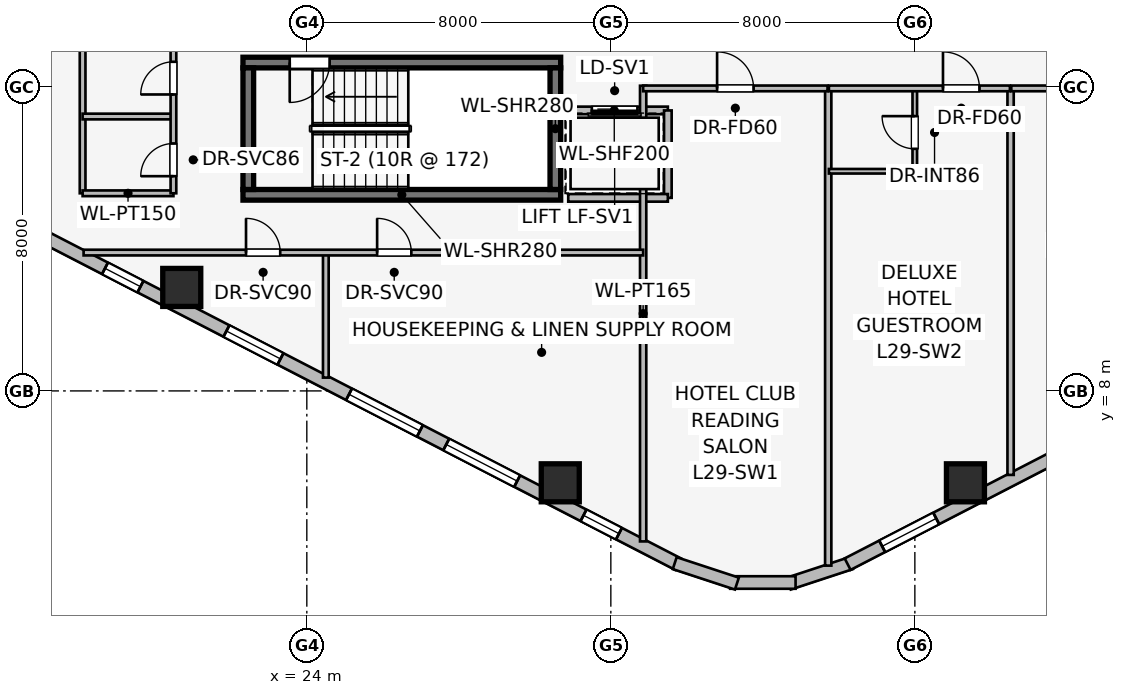
"""IFC4 building model, lengths in metres.
Left out: names, types, materials, properties, quantities, classifications, styles, units other than length and angle.
Written with IfcOpenShell. Run it as: python <this file> out.ifc"""

import sys

from ifc_helpers import new_model, si_unit, direction, frame, frame_2d, origin, origin_2d, place, context, subcontext, project, spatial, rectangle, extrude, element, fill, save


model = new_model("IFC4")
c1 = context("Model", 3, precision=1e-05, world=origin(), true_north=direction((0.0, 1.0)))
c2 = subcontext(c1, "Body", "Model", "MODEL_VIEW")
j1 = project(units=[si_unit("LENGTHUNIT", "METRE"), si_unit("PLANEANGLEUNIT", "RADIAN")], contexts=[c1])
p1 = place(None, origin())
s1 = spatial("IfcSite", under=j1, at=p1, CompositionType="ELEMENT")
p2 = place(p1, origin())
s2 = spatial("IfcBuilding", under=s1, at=p2, CompositionType="ELEMENT")
p3 = place(p2, frame((0.0, 0.0, 111.9)))
s3 = spatial("IfcBuildingStorey", under=s2, at=p3, CompositionType="ELEMENT", Elevation=111.9)
p4 = place(p3, frame((22.32, 13.16, 0.0), z_axis=(0.0, 0.0, 1.0), x_axis=(1.0, 0.0, 0.0)))
e1 = element("IfcWall", 1, at=p4, inside=s3, PredefinedType="SHEAR", context=c2, shape_type="SweptSolid", body=[
    extrude(rectangle(XDim=8.36, YDim=0.28, at=frame_2d((4.18, 0.0))), origin(), (0.0, 0.0, 1.0), 3.45),
])
p5 = place(p3, frame((30.68, 16.64, 0.0), z_axis=(0.0, 0.0, 1.0), x_axis=(-1.0, 0.0, 0.0)))
e2 = element("IfcWall", 2, at=p5, inside=s3, PredefinedType="SHEAR", context=c2, shape_type="SweptSolid", body=[
    extrude(rectangle(XDim=8.36, YDim=0.28, at=frame_2d((4.18, 0.0))), origin(), (0.0, 0.0, 1.0), 3.45),
])
p6 = place(p5, frame((6.08, 0.0, 0.0)))
e3 = element("IfcOpeningElement", 3, at=p6, cuts=e2, PredefinedType="OPENING", context=c2, shape_type="SweptSolid", body=[
    extrude(rectangle(XDim=1.05, YDim=2.0, at=frame_2d((0.525, 1.0))), frame((0.0, 0.15, 0.0), z_axis=(0.0, -1.0, 0.0), x_axis=(1.0, 0.0, 0.0)), (0.0, 0.0, 1.0), 0.3),
])
for number, where, z_axis, x_axis in (
    (4, (22.46, 16.5, 0.0), (0.0, 0.0, 1.0), (0.0, -1.0, 0.0)),
    (5, (30.54, 13.3, 0.0), (0.0, 0.0, 1.0), (0.0, 1.0, 0.0)),
):
    element("IfcWall", number, at=place(p3, frame(where, z_axis=z_axis, x_axis=x_axis)), inside=s3, PredefinedType="SHEAR", context=c2, shape_type="SweptSolid", body=[
        extrude(rectangle(XDim=3.2, YDim=0.28, at=frame_2d((1.6, 0.0))), origin(), (0.0, 0.0, 1.0), 3.45),
    ])
for number, where, z_axis, x_axis in (
    (6, (20.709, 10.723, 0.0), (0.0, 0.0, 1.0), (1.0, 0.0, 0.0)),
    (7, (30.669, 5.582, 0.0), (0.0, 0.0, 1.0), (1.0, 0.0, 0.0)),
    (8, (41.331, 5.582, 0.0), (0.0, 0.0, 1.0), (1.0, 0.0, 0.0)),
):
    element("IfcColumn", number, at=place(p3, frame(where, z_axis=z_axis, x_axis=x_axis)), inside=s3, PredefinedType="COLUMN", context=c2, shape_type="SweptSolid", body=[
        extrude(rectangle(XDim=1.0, YDim=1.0, at=origin_2d()), origin(), (0.0, 0.0, 1.0), 3.45),
    ])
p7 = place(p3, frame((17.243, 11.95, 0.0), z_axis=(0.0, 0.0, 1.0), x_axis=(-0.790621329885, 0.612305408053, 0.0)))
e9 = element("IfcWall", 9, at=p7, inside=s3, PredefinedType="STANDARD", context=c2, shape_type="SweptSolid", body=[
    extrude(rectangle(XDim=1.676, YDim=0.33, at=frame_2d((0.838, 0.0))), origin(), (0.0, 0.0, 1.0), 3.16),
])
p8 = place(p3, frame((33.769, 3.442, 0.0), z_axis=(0.0, 0.0, 1.0), x_axis=(-0.888613612362, 0.458656568606, 0.0)))
e10 = element("IfcWall", 10, at=p8, inside=s3, PredefinedType="STANDARD", context=c2, shape_type="SweptSolid", body=[
    extrude(rectangle(XDim=18.681, YDim=0.34, at=frame_2d((9.34, 0.0))), origin(), (0.0, 0.0, 1.0), 3.16),
])
p9 = place(p8, frame((1.75, 0.0, 0.75)))
e11 = element("IfcOpeningElement", 11, at=p9, cuts=e10, PredefinedType="OPENING", context=c2, shape_type="SweptSolid", body=[
    extrude(rectangle(XDim=1.05, YDim=1.4, at=frame_2d((0.525, 0.7))), frame((0.0, 0.18, 0.0), z_axis=(0.0, -1.0, 0.0), x_axis=(1.0, 0.0, 0.0)), (0.0, 0.0, 1.0), 0.36),
])
p10 = place(p8, frame((4.765, 0.0, 0.75)))
e12 = element("IfcOpeningElement", 12, at=p10, cuts=e10, PredefinedType="OPENING", context=c2, shape_type="SweptSolid", body=[
    extrude(rectangle(XDim=2.1, YDim=1.5, at=frame_2d((1.05, 0.75))), frame((0.0, 0.18, 0.0), z_axis=(0.0, -1.0, 0.0), x_axis=(1.0, 0.0, 0.0)), (0.0, 0.0, 1.0), 0.36),
])
p11 = place(p8, frame((7.644, 0.0, 0.75)))
e13 = element("IfcOpeningElement", 13, at=p11, cuts=e10, PredefinedType="OPENING", context=c2, shape_type="SweptSolid", body=[
    extrude(rectangle(XDim=2.1, YDim=1.5, at=frame_2d((1.05, 0.75))), frame((0.0, 0.18, 0.0), z_axis=(0.0, -1.0, 0.0), x_axis=(1.0, 0.0, 0.0)), (0.0, 0.0, 1.0), 0.36),
])
p12 = place(p8, frame((11.774, 0.0, 0.75)))
e14 = element("IfcOpeningElement", 14, at=p12, cuts=e10, PredefinedType="OPENING", context=c2, shape_type="SweptSolid", body=[
    extrude(rectangle(XDim=1.6, YDim=1.55, at=frame_2d((0.8, 0.775))), frame((0.0, 0.18, 0.0), z_axis=(0.0, -1.0, 0.0), x_axis=(1.0, 0.0, 0.0)), (0.0, 0.0, 1.0), 0.36),
])
p13 = place(p8, frame((15.92, 0.0, 0.75)))
e15 = element("IfcOpeningElement", 15, at=p13, cuts=e10, PredefinedType="OPENING", context=c2, shape_type="SweptSolid", body=[
    extrude(rectangle(XDim=1.05, YDim=1.4, at=frame_2d((0.525, 0.7))), frame((0.0, 0.18, 0.0), z_axis=(0.0, -1.0, 0.0), x_axis=(1.0, 0.0, 0.0)), (0.0, 0.0, 1.0), 0.36),
])
for number, where, z_axis, x_axis in (
    (16, (38.319, 3.468, 0.0), (0.0, 0.0, 1.0), (-0.95, -0.312, 0.0)),
    (17, (36.861, 2.959, 0.0), (0.0, 0.0, 1.0), (-1.0, 0.0, 0.0)),
    (18, (35.317, 2.93, 0.0), (0.0, 0.0, 1.0), (-0.95, 0.312, 0.0)),
):
    element("IfcWall", number, at=place(p3, frame(where, z_axis=z_axis, x_axis=x_axis)), inside=s3, PredefinedType="STANDARD", context=c2, shape_type="SweptSolid", body=[
        extrude(rectangle(XDim=1.722, YDim=0.33, at=frame_2d((0.861, 0.0))), origin(), (0.0, 0.0, 1.0), 3.16),
    ])
p14 = place(p3, frame((54.831, 12.01, 0.0), z_axis=(0.0, 0.0, 1.0), x_axis=(-0.888613612362, -0.458656568606, 0.0)))
e19 = element("IfcWall", 19, at=p14, inside=s3, PredefinedType="STANDARD", context=c2, shape_type="SweptSolid", body=[
    extrude(rectangle(XDim=18.681, YDim=0.34, at=frame_2d((9.34, 0.0))), origin(), (0.0, 0.0, 1.0), 3.16),
])
p15 = place(p14, frame((1.023, 0.0, 0.75)))
e20 = element("IfcOpeningElement", 20, at=p15, cuts=e19, PredefinedType="OPENING", context=c2, shape_type="SweptSolid", body=[
    extrude(rectangle(XDim=1.6, YDim=1.55, at=frame_2d((0.8, 0.775))), frame((0.0, 0.18, 0.0), z_axis=(0.0, -1.0, 0.0), x_axis=(1.0, 0.0, 0.0)), (0.0, 0.0, 1.0), 0.36),
])
p16 = place(p14, frame((6.848, 0.0, 0.75)))
e21 = element("IfcOpeningElement", 21, at=p16, cuts=e19, PredefinedType="OPENING", context=c2, shape_type="SweptSolid", body=[
    extrude(rectangle(XDim=2.1, YDim=1.5, at=frame_2d((1.05, 0.75))), frame((0.0, 0.18, 0.0), z_axis=(0.0, -1.0, 0.0), x_axis=(1.0, 0.0, 0.0)), (0.0, 0.0, 1.0), 0.36),
])
p17 = place(p14, frame((10.536, 0.0, 0.75)))
e22 = element("IfcOpeningElement", 22, at=p17, cuts=e19, PredefinedType="OPENING", context=c2, shape_type="SweptSolid", body=[
    extrude(rectangle(XDim=2.1, YDim=1.5, at=frame_2d((1.05, 0.75))), frame((0.0, 0.18, 0.0), z_axis=(0.0, -1.0, 0.0), x_axis=(1.0, 0.0, 0.0)), (0.0, 0.0, 1.0), 0.36),
])
p18 = place(p14, frame((16.058, 0.0, 0.75)))
e23 = element("IfcOpeningElement", 23, at=p18, cuts=e19, PredefinedType="OPENING", context=c2, shape_type="SweptSolid", body=[
    extrude(rectangle(XDim=1.6, YDim=1.55, at=frame_2d((0.8, 0.775))), frame((0.0, 0.18, 0.0), z_axis=(0.0, -1.0, 0.0), x_axis=(1.0, 0.0, 0.0)), (0.0, 0.0, 1.0), 0.36),
])
p19 = place(p3, frame((33.5, 15.38, 0.0), z_axis=(0.0, 0.0, 1.0), x_axis=(-1.0, 0.0, 0.0)))
e24 = element("IfcWall", 24, at=p19, inside=s3, PredefinedType="PARTITIONING", context=c2, shape_type="SweptSolid", body=[
    extrude(rectangle(XDim=2.82, YDim=0.2, at=frame_2d((1.41, 0.0))), origin(), (0.0, 0.0, 1.0), 3.16),
])
p20 = place(p19, frame((0.8, 0.0, 0.0)))
e25 = element("IfcOpeningElement", 25, at=p20, cuts=e24, PredefinedType="OPENING", context=c2, shape_type="SweptSolid", body=[
    extrude(rectangle(XDim=1.2, YDim=2.2, at=frame_2d((0.6, 1.1))), frame((0.0, 0.11, 0.0), z_axis=(0.0, -1.0, 0.0), x_axis=(1.0, 0.0, 0.0)), (0.0, 0.0, 1.0), 0.22),
])
p21 = place(p3, frame((33.5, 13.08, 0.0), z_axis=(0.0, 0.0, 1.0), x_axis=(0.0, 1.0, 0.0)))
e26 = element("IfcWall", 26, at=p21, inside=s3, PredefinedType="PARTITIONING", context=c2, shape_type="SweptSolid", body=[
    extrude(rectangle(XDim=2.3, YDim=0.2, at=frame_2d((1.15, 0.0))), origin(), (0.0, 0.0, 1.0), 3.16),
])
p22 = place(p3, frame((30.879, 13.08, 0.0), z_axis=(0.0, 0.0, 1.0), x_axis=(1.0, 0.0, 0.0)))
e27 = element("IfcWall", 27, at=p22, inside=s3, PredefinedType="PARTITIONING", context=c2, shape_type="SweptSolid", body=[
    extrude(rectangle(XDim=2.621, YDim=0.2, at=frame_2d((1.311, 0.0))), origin(), (0.0, 0.0, 1.0), 3.16),
])
p23 = place(p3, frame((18.1, 17.34, 0.0), z_axis=(0.0, 0.0, 1.0), x_axis=(0.0, -1.0, 0.0)))
e28 = element("IfcWall", 28, at=p23, inside=s3, PredefinedType="PARTITIONING", context=c2, shape_type="SweptSolid", body=[
    extrude(rectangle(XDim=4.14, YDim=0.15, at=frame_2d((2.07, 0.0))), origin(), (0.0, 0.0, 1.0), 3.16),
])
for number, where, z_axis, x_axis in (
    (29, (18.1, 13.2, 0.0), (0.0, 0.0, 1.0), (1.0, 0.0, 0.0)),
    (30, (18.1, 15.22, 0.0), (0.0, 0.0, 1.0), (1.0, 0.0, 0.0)),
):
    element("IfcWall", number, at=place(p3, frame(where, z_axis=z_axis, x_axis=x_axis)), inside=s3, PredefinedType="PARTITIONING", context=c2, shape_type="SweptSolid", body=[
        extrude(rectangle(XDim=2.39, YDim=0.15, at=frame_2d((1.195, 0.0))), origin(), (0.0, 0.0, 1.0), 3.16),
    ])
p24 = place(p3, frame((20.49, 13.2, 0.0), z_axis=(0.0, 0.0, 1.0), x_axis=(0.0, 1.0, 0.0)))
e31 = element("IfcWall", 31, at=p24, inside=s3, PredefinedType="PARTITIONING", context=c2, shape_type="SweptSolid", body=[
    extrude(rectangle(XDim=4.14, YDim=0.15, at=frame_2d((2.07, 0.0))), origin(), (0.0, 0.0, 1.0), 3.16),
])
p25 = place(p24, frame((0.45, 0.0, 0.0)))
e32 = element("IfcOpeningElement", 32, at=p25, cuts=e31, PredefinedType="OPENING", context=c2, shape_type="SweptSolid", body=[
    extrude(rectangle(XDim=0.86, YDim=2.0, at=frame_2d((0.43, 1.0))), frame((0.0, 0.085, 0.0), z_axis=(0.0, -1.0, 0.0), x_axis=(1.0, 0.0, 0.0)), (0.0, 0.0, 1.0), 0.17),
])
p26 = place(p24, frame((2.6, 0.0, 0.0)))
e33 = element("IfcOpeningElement", 33, at=p26, cuts=e31, PredefinedType="OPENING", context=c2, shape_type="SweptSolid", body=[
    extrude(rectangle(XDim=0.86, YDim=2.0, at=frame_2d((0.43, 1.0))), frame((0.0, 0.085, 0.0), z_axis=(0.0, -1.0, 0.0), x_axis=(1.0, 0.0, 0.0)), (0.0, 0.0, 1.0), 0.17),
])
p27 = place(p3, frame((32.85, 4.04, 0.0), z_axis=(0.0, 0.0, 1.0), x_axis=(0.0, 1.0, 0.0)))
e34 = element("IfcWall", 34, at=p27, inside=s3, PredefinedType="PARTITIONING", context=c2, shape_type="SweptSolid", body=[
    extrude(rectangle(XDim=11.99, YDim=0.165, at=frame_2d((5.995, 0.0))), origin(), (0.0, 0.0, 1.0), 3.16),
])
p28 = place(p3, frame((24.5, 8.35, 0.0), z_axis=(0.0, 0.0, 1.0), x_axis=(0.0, 1.0, 0.0)))
e35 = element("IfcWall", 35, at=p28, inside=s3, PredefinedType="PARTITIONING", context=c2, shape_type="SweptSolid", body=[
    extrude(rectangle(XDim=3.29, YDim=0.15, at=frame_2d((1.645, 0.0))), origin(), (0.0, 0.0, 1.0), 3.16),
])
p29 = place(p3, frame((18.126, 11.64, 0.0), z_axis=(0.0, 0.0, 1.0), x_axis=(1.0, 0.0, 0.0)))
e36 = element("IfcWall", 36, at=p29, inside=s3, PredefinedType="PARTITIONING", context=c2, shape_type="SweptSolid", body=[
    extrude(rectangle(XDim=14.724, YDim=0.15, at=frame_2d((7.362, 0.0))), origin(), (0.0, 0.0, 1.0), 3.16),
])
p30 = place(p29, frame((4.274, 0.0, 0.0)))
e37 = element("IfcOpeningElement", 37, at=p30, cuts=e36, PredefinedType="OPENING", context=c2, shape_type="SweptSolid", body=[
    extrude(rectangle(XDim=0.9, YDim=2.0, at=frame_2d((0.45, 1.0))), frame((0.0, 0.085, 0.0), z_axis=(0.0, -1.0, 0.0), x_axis=(1.0, 0.0, 0.0)), (0.0, 0.0, 1.0), 0.17),
])
p31 = place(p29, frame((7.724, 0.0, 0.0)))
e38 = element("IfcOpeningElement", 38, at=p31, cuts=e36, PredefinedType="OPENING", context=c2, shape_type="SweptSolid", body=[
    extrude(rectangle(XDim=0.9, YDim=2.0, at=frame_2d((0.45, 1.0))), frame((0.0, 0.085, 0.0), z_axis=(0.0, -1.0, 0.0), x_axis=(1.0, 0.0, 0.0)), (0.0, 0.0, 1.0), 0.17),
])
p32 = place(p3, frame((37.72, 3.403, 0.0), z_axis=(0.0, 0.0, 1.0), x_axis=(0.0, 1.0, 0.0)))
e39 = element("IfcWall", 39, at=p32, inside=s3, PredefinedType="PARTITIONING", context=c2, shape_type="SweptSolid", body=[
    extrude(rectangle(XDim=12.527, YDim=0.165, at=frame_2d((6.263, 0.0))), origin(), (0.0, 0.0, 1.0), 3.16),
])
p33 = place(p3, frame((42.519, 5.79, 0.0), z_axis=(0.0, 0.0, 1.0), x_axis=(0.0, 1.0, 0.0)))
e40 = element("IfcWall", 40, at=p33, inside=s3, PredefinedType="PARTITIONING", context=c2, shape_type="SweptSolid", body=[
    extrude(rectangle(XDim=10.14, YDim=0.165, at=frame_2d((5.07, 0.0))), origin(), (0.0, 0.0, 1.0), 3.16),
])
p34 = place(p3, frame((32.85, 15.96, 0.0), z_axis=(0.0, 0.0, 1.0), x_axis=(1.0, 0.0, 0.0)))
e41 = element("IfcWall", 41, at=p34, inside=s3, PredefinedType="PARTITIONING", context=c2, shape_type="SweptSolid", body=[
    extrude(rectangle(XDim=4.852, YDim=0.15, at=frame_2d((2.426, 0.0))), origin(), (0.0, 0.0, 1.0), 3.16),
])
p35 = place(p34, frame((1.946, 0.0, 0.0)))
e42 = element("IfcOpeningElement", 42, at=p35, cuts=e41, PredefinedType="OPENING", context=c2, shape_type="SweptSolid", body=[
    extrude(rectangle(XDim=0.96, YDim=2.0, at=frame_2d((0.48, 1.0))), frame((0.0, 0.085, 0.0), z_axis=(0.0, -1.0, 0.0), x_axis=(1.0, 0.0, 0.0)), (0.0, 0.0, 1.0), 0.17),
])
p36 = place(p3, frame((39.998, 13.72, 0.0), z_axis=(0.0, 0.0, 1.0), x_axis=(0.0, 1.0, 0.0)))
e43 = element("IfcWall", 43, at=p36, inside=s3, PredefinedType="PARTITIONING", context=c2, shape_type="SweptSolid", body=[
    extrude(rectangle(XDim=2.24, YDim=0.12, at=frame_2d((1.12, 0.0))), origin(), (0.0, 0.0, 1.0), 2.39),
])
p37 = place(p36, frame((0.65, 0.0, 0.0)))
e44 = element("IfcOpeningElement", 44, at=p37, cuts=e43, PredefinedType="OPENING", context=c2, shape_type="SweptSolid", body=[
    extrude(rectangle(XDim=0.86, YDim=2.0, at=frame_2d((0.43, 1.0))), frame((0.0, 0.07, 0.0), z_axis=(0.0, -1.0, 0.0), x_axis=(1.0, 0.0, 0.0)), (0.0, 0.0, 1.0), 0.14),
])
p38 = place(p3, frame((37.738, 13.78, 0.0), z_axis=(0.0, 0.0, 1.0), x_axis=(1.0, 0.0, 0.0)))
e45 = element("IfcWall", 45, at=p38, inside=s3, PredefinedType="PARTITIONING", context=c2, shape_type="SweptSolid", body=[
    extrude(rectangle(XDim=2.32, YDim=0.12, at=frame_2d((1.16, 0.0))), origin(), (0.0, 0.0, 1.0), 3.16),
])
p39 = place(p3, frame((37.738, 15.96, 0.0), z_axis=(0.0, 0.0, 1.0), x_axis=(1.0, 0.0, 0.0)))
e46 = element("IfcWall", 46, at=p39, inside=s3, PredefinedType="PARTITIONING", context=c2, shape_type="SweptSolid", body=[
    extrude(rectangle(XDim=4.763, YDim=0.15, at=frame_2d((2.381, 0.0))), origin(), (0.0, 0.0, 1.0), 3.16),
])
p40 = place(p39, frame((3.002, 0.0, 0.0)))
e47 = element("IfcOpeningElement", 47, at=p40, cuts=e46, PredefinedType="OPENING", context=c2, shape_type="SweptSolid", body=[
    extrude(rectangle(XDim=0.96, YDim=2.0, at=frame_2d((0.48, 1.0))), frame((0.0, 0.085, 0.0), z_axis=(0.0, -1.0, 0.0), x_axis=(1.0, 0.0, 0.0)), (0.0, 0.0, 1.0), 0.17),
])
p41 = place(p3, frame((42.537, 15.96, 0.0), z_axis=(0.0, 0.0, 1.0), x_axis=(1.0, 0.0, 0.0)))
e48 = element("IfcWall", 48, at=p41, inside=s3, PredefinedType="PARTITIONING", context=c2, shape_type="SweptSolid", body=[
    extrude(rectangle(XDim=7.164, YDim=0.15, at=frame_2d((3.582, 0.0))), origin(), (0.0, 0.0, 1.0), 3.16),
])
p42 = place(p41, frame((3.102, 0.0, 0.0)))
e49 = element("IfcOpeningElement", 49, at=p42, cuts=e48, PredefinedType="OPENING", context=c2, shape_type="SweptSolid", body=[
    extrude(rectangle(XDim=0.96, YDim=2.0, at=frame_2d((0.48, 1.0))), frame((0.0, 0.085, 0.0), z_axis=(0.0, -1.0, 0.0), x_axis=(1.0, 0.0, 0.0)), (0.0, 0.0, 1.0), 0.17),
])
p43 = place(p9, origin())
e50 = element("IfcWindow", 50, at=p43, inside=s3, PartitioningType="SINGLE_PANEL", PredefinedType="WINDOW", context=c2, shape_type="SweptSolid", body=[
    extrude(rectangle(XDim=1.05, YDim=1.4, at=frame_2d((0.525, 0.7))), frame((0.0, 0.03, 0.0), z_axis=(0.0, -1.0, 0.0), x_axis=(1.0, 0.0, 0.0)), (0.0, 0.0, 1.0), 0.06),
])
fill(e11, e50)
p44 = place(p10, origin())
e51 = element("IfcWindow", 51, at=p44, inside=s3, PartitioningType="SINGLE_PANEL", PredefinedType="WINDOW", context=c2, shape_type="SweptSolid", body=[
    extrude(rectangle(XDim=2.1, YDim=1.5, at=frame_2d((1.05, 0.75))), frame((0.0, 0.03, 0.0), z_axis=(0.0, -1.0, 0.0), x_axis=(1.0, 0.0, 0.0)), (0.0, 0.0, 1.0), 0.06),
])
fill(e12, e51)
p45 = place(p11, origin())
e52 = element("IfcWindow", 52, at=p45, inside=s3, PartitioningType="SINGLE_PANEL", PredefinedType="WINDOW", context=c2, shape_type="SweptSolid", body=[
    extrude(rectangle(XDim=2.1, YDim=1.5, at=frame_2d((1.05, 0.75))), frame((0.0, 0.03, 0.0), z_axis=(0.0, -1.0, 0.0), x_axis=(1.0, 0.0, 0.0)), (0.0, 0.0, 1.0), 0.06),
])
fill(e13, e52)
p46 = place(p12, origin())
e53 = element("IfcWindow", 53, at=p46, inside=s3, PartitioningType="SINGLE_PANEL", PredefinedType="WINDOW", context=c2, shape_type="SweptSolid", body=[
    extrude(rectangle(XDim=1.6, YDim=1.55, at=frame_2d((0.8, 0.775))), frame((0.0, 0.03, 0.0), z_axis=(0.0, -1.0, 0.0), x_axis=(1.0, 0.0, 0.0)), (0.0, 0.0, 1.0), 0.06),
])
fill(e14, e53)
p47 = place(p13, origin())
e54 = element("IfcWindow", 54, at=p47, inside=s3, PartitioningType="SINGLE_PANEL", PredefinedType="WINDOW", context=c2, shape_type="SweptSolid", body=[
    extrude(rectangle(XDim=1.05, YDim=1.4, at=frame_2d((0.525, 0.7))), frame((0.0, 0.03, 0.0), z_axis=(0.0, -1.0, 0.0), x_axis=(1.0, 0.0, 0.0)), (0.0, 0.0, 1.0), 0.06),
])
fill(e15, e54)
p48 = place(p18, origin())
e55 = element("IfcWindow", 55, at=p48, inside=s3, PartitioningType="SINGLE_PANEL", PredefinedType="WINDOW", context=c2, shape_type="SweptSolid", body=[
    extrude(rectangle(XDim=1.6, YDim=1.55, at=frame_2d((0.8, 0.775))), frame((0.0, 0.03, 0.0), z_axis=(0.0, -1.0, 0.0), x_axis=(1.0, 0.0, 0.0)), (0.0, 0.0, 1.0), 0.06),
])
fill(e23, e55)
p49 = place(p6, origin())
e56 = element("IfcDoor", 56, at=p49, inside=s3, OperationType="SINGLE_SWING_RIGHT", PredefinedType="DOOR", context=c2, shape_type="SweptSolid", body=[
    extrude(rectangle(XDim=1.05, YDim=2.0, at=frame_2d((0.525, 1.0))), frame((0.0, 0.025, 0.0), z_axis=(0.0, -1.0, 0.0), x_axis=(1.0, 0.0, 0.0)), (0.0, 0.0, 1.0), 0.05),
])
fill(e3, e56)
p50 = place(p20, origin())
e57 = element("IfcDoor", 57, at=p50, inside=s3, OperationType="SLIDING_TO_RIGHT", PredefinedType="DOOR", context=c2, shape_type="SweptSolid", body=[
    extrude(rectangle(XDim=1.2, YDim=2.2, at=frame_2d((0.6, 1.1))), frame((0.0, 0.025, 0.0), z_axis=(0.0, -1.0, 0.0), x_axis=(1.0, 0.0, 0.0)), (0.0, 0.0, 1.0), 0.05),
])
fill(e25, e57)
p51 = place(p25, origin())
e58 = element("IfcDoor", 58, at=p51, inside=s3, OperationType="SINGLE_SWING_LEFT", PredefinedType="DOOR", context=c2, shape_type="SweptSolid", body=[
    extrude(rectangle(XDim=0.86, YDim=2.0, at=frame_2d((0.43, 1.0))), frame((0.0, 0.025, 0.0), z_axis=(0.0, -1.0, 0.0), x_axis=(1.0, 0.0, 0.0)), (0.0, 0.0, 1.0), 0.05),
])
fill(e32, e58)
p52 = place(p26, origin())
e59 = element("IfcDoor", 59, at=p52, inside=s3, OperationType="SINGLE_SWING_LEFT", PredefinedType="DOOR", context=c2, shape_type="SweptSolid", body=[
    extrude(rectangle(XDim=0.86, YDim=2.0, at=frame_2d((0.43, 1.0))), frame((0.0, 0.025, 0.0), z_axis=(0.0, -1.0, 0.0), x_axis=(1.0, 0.0, 0.0)), (0.0, 0.0, 1.0), 0.05),
])
fill(e33, e59)
p53 = place(p30, origin())
e60 = element("IfcDoor", 60, at=p53, inside=s3, OperationType="SINGLE_SWING_LEFT", PredefinedType="DOOR", context=c2, shape_type="SweptSolid", body=[
    extrude(rectangle(XDim=0.9, YDim=2.0, at=frame_2d((0.45, 1.0))), frame((0.0, 0.025, 0.0), z_axis=(0.0, -1.0, 0.0), x_axis=(1.0, 0.0, 0.0)), (0.0, 0.0, 1.0), 0.05),
])
fill(e37, e60)
p54 = place(p31, origin())
e61 = element("IfcDoor", 61, at=p54, inside=s3, OperationType="SINGLE_SWING_LEFT", PredefinedType="DOOR", context=c2, shape_type="SweptSolid", body=[
    extrude(rectangle(XDim=0.9, YDim=2.0, at=frame_2d((0.45, 1.0))), frame((0.0, 0.025, 0.0), z_axis=(0.0, -1.0, 0.0), x_axis=(1.0, 0.0, 0.0)), (0.0, 0.0, 1.0), 0.05),
])
fill(e38, e61)
p55 = place(p35, origin())
e62 = element("IfcDoor", 62, at=p55, inside=s3, OperationType="SINGLE_SWING_LEFT", PredefinedType="DOOR", context=c2, shape_type="SweptSolid", body=[
    extrude(rectangle(XDim=0.96, YDim=2.0, at=frame_2d((0.48, 1.0))), frame((0.0, 0.025, 0.0), z_axis=(0.0, -1.0, 0.0), x_axis=(1.0, 0.0, 0.0)), (0.0, 0.0, 1.0), 0.05),
])
fill(e42, e62)
p56 = place(p37, origin())
e63 = element("IfcDoor", 63, at=p56, inside=s3, OperationType="SINGLE_SWING_RIGHT", PredefinedType="DOOR", context=c2, shape_type="SweptSolid", body=[
    extrude(rectangle(XDim=0.86, YDim=2.0, at=frame_2d((0.43, 1.0))), frame((0.0, 0.025, 0.0), z_axis=(0.0, -1.0, 0.0), x_axis=(1.0, 0.0, 0.0)), (0.0, 0.0, 1.0), 0.05),
])
fill(e44, e63)
p57 = place(p40, origin())
e64 = element("IfcDoor", 64, at=p57, inside=s3, OperationType="SINGLE_SWING_LEFT", PredefinedType="DOOR", context=c2, shape_type="SweptSolid", body=[
    extrude(rectangle(XDim=0.96, YDim=2.0, at=frame_2d((0.48, 1.0))), frame((0.0, 0.025, 0.0), z_axis=(0.0, -1.0, 0.0), x_axis=(1.0, 0.0, 0.0)), (0.0, 0.0, 1.0), 0.05),
])
fill(e47, e64)
save(model, sys.argv[1])
